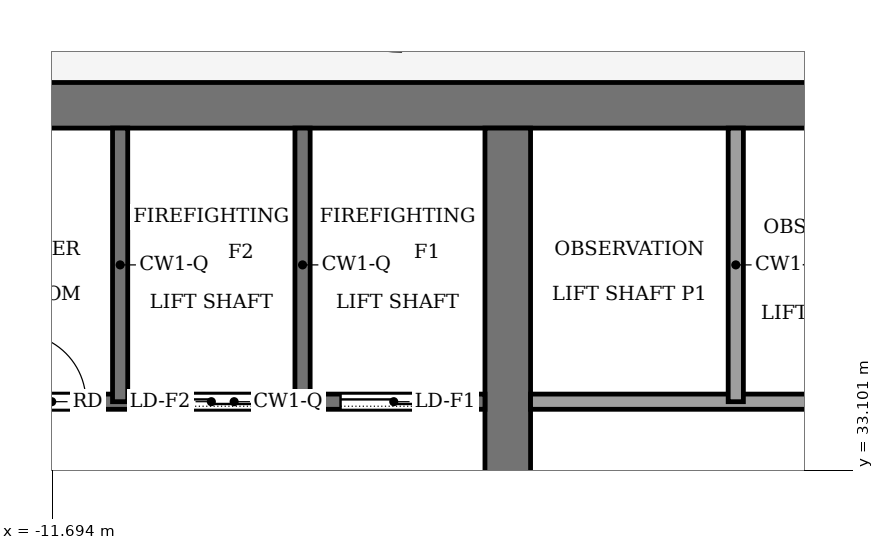
"""IFC4 building model, lengths in metres.
Left out: names, types, materials, properties, quantities, classifications, styles, units other than length and angle.
Written with IfcOpenShell. Run it as: python <this file> out.ifc"""

import sys

from ifc_helpers import new_model, si_unit, direction, frame, frame_2d, origin, place, context, subcontext, project, spatial, rectangle, extrude, element, fill, save


model = new_model("IFC4")
c1 = context("Model", 3, precision=1e-05, world=origin(), true_north=direction((0.0, 1.0)))
c2 = subcontext(c1, "Body", "Model", "MODEL_VIEW")
j1 = project(units=[si_unit("LENGTHUNIT", "METRE"), si_unit("PLANEANGLEUNIT", "RADIAN")], contexts=[c1])
p1 = place(None, origin())
s1 = spatial("IfcSite", under=j1, at=p1, CompositionType="ELEMENT")
p2 = place(p1, origin())
s2 = spatial("IfcBuilding", under=s1, at=p2, CompositionType="ELEMENT")
p3 = place(p2, frame((0.0, 0.0, 340.5)))
s3 = spatial("IfcBuildingStorey", under=s2, at=p3, CompositionType="ELEMENT", Elevation=340.5)
p4 = place(p3, frame((-13.2, 37.9, -0.15), z_axis=(0.0, 0.0, 1.0), x_axis=(1.0, 0.0, 0.0)))
e1 = element("IfcWall", 1, at=p4, inside=s3, PredefinedType="SHEAR", context=c2, shape_type="SweptSolid", body=[
    extrude(rectangle(XDim=26.4, YDim=0.6, at=frame_2d((13.2, 0.0))), origin(), (0.0, 0.0, 1.0), 9.0),
])
p5 = place(p3, frame((-5.7, 18.4, -0.15), z_axis=(0.0, 0.0, 1.0), x_axis=(0.0, 1.0, 0.0)))
e2 = element("IfcWall", 2, at=p5, inside=s3, PredefinedType="SHEAR", context=c2, shape_type="SweptSolid", body=[
    extrude(rectangle(XDim=19.2, YDim=0.6, at=frame_2d((9.6, 0.0))), origin(), (0.0, 0.0, 1.0), 9.0),
])
p6 = place(p5, frame((8.35, 0.0, 0.15)))
e3 = element("IfcOpeningElement", 3, at=p6, cuts=e2, PredefinedType="OPENING", context=c2, shape_type="SweptSolid", body=[
    extrude(rectangle(XDim=0.9, YDim=2.1, at=frame_2d((0.45, 1.05))), frame((0.0, 0.31, 0.0), z_axis=(0.0, -1.0, 0.0), x_axis=(1.0, 0.0, 0.0)), (0.0, 0.0, 1.0), 0.62),
])
p7 = place(p3, frame((-12.6, 34.0, 0.0), z_axis=(0.0, 0.0, 1.0), x_axis=(1.0, 0.0, 0.0)))
e4 = element("IfcWall", 4, at=p7, inside=s3, PredefinedType="PARTITIONING", context=c2, shape_type="SweptSolid", body=[
    extrude(rectangle(XDim=6.6, YDim=0.2, at=frame_2d((3.3, 0.0))), origin(), (0.0, 0.0, 1.0), 8.85),
])
p8 = place(p7, frame((4.7, 0.0, 0.0)))
e5 = element("IfcOpeningElement", 5, at=p8, cuts=e4, PredefinedType="OPENING", context=c2, shape_type="SweptSolid", body=[
    extrude(rectangle(XDim=1.4, YDim=2.2, at=frame_2d((0.7, 1.1))), frame((0.0, 0.11, 0.0), z_axis=(0.0, -1.0, 0.0), x_axis=(1.0, 0.0, 0.0)), (0.0, 0.0, 1.0), 0.22),
])
p9 = place(p7, frame((2.3, 0.0, 0.0)))
e6 = element("IfcOpeningElement", 6, at=p9, cuts=e4, PredefinedType="OPENING", context=c2, shape_type="SweptSolid", body=[
    extrude(rectangle(XDim=1.4, YDim=2.2, at=frame_2d((0.7, 1.1))), frame((0.0, 0.11, 0.0), z_axis=(0.0, -1.0, 0.0), x_axis=(1.0, 0.0, 0.0)), (0.0, 0.0, 1.0), 0.22),
])
p10 = place(p7, frame((0.45, 0.0, 0.0)))
e7 = element("IfcOpeningElement", 7, at=p10, cuts=e4, PredefinedType="OPENING", context=c2, shape_type="SweptSolid", body=[
    extrude(rectangle(XDim=0.9, YDim=2.1, at=frame_2d((0.45, 1.05))), frame((0.0, 0.11, 0.0), z_axis=(0.0, -1.0, 0.0), x_axis=(1.0, 0.0, 0.0)), (0.0, 0.0, 1.0), 0.22),
])
p11 = place(p3, frame((-5.4, 34.0, 0.0), z_axis=(0.0, 0.0, 1.0), x_axis=(1.0, 0.0, 0.0)))
e8 = element("IfcWall", 8, at=p11, inside=s3, PredefinedType="PARTITIONING", context=c2, shape_type="SweptSolid", body=[
    extrude(rectangle(XDim=10.8, YDim=0.2, at=frame_2d((5.4, 0.0))), origin(), (0.0, 0.0, 1.0), 8.85),
])
p12 = place(p11, frame((8.95, 0.0, 0.0)))
e9 = element("IfcOpeningElement", 9, at=p12, cuts=e8, PredefinedType="OPENING", context=c2, shape_type="SweptSolid", body=[
    extrude(rectangle(XDim=1.0, YDim=2.1, at=frame_2d((0.5, 1.05))), frame((0.0, 0.11, 0.0), z_axis=(0.0, -1.0, 0.0), x_axis=(1.0, 0.0, 0.0)), (0.0, 0.0, 1.0), 0.22),
])
for number, where, z_axis, x_axis in (
    (10, (-10.8, 34.0, 0.0), (0.0, 0.0, 1.0), (0.0, 1.0, 0.0)),
    (11, (-8.4, 34.0, 0.0), (0.0, 0.0, 1.0), (0.0, 1.0, 0.0)),
    (12, (-2.7, 34.0, 0.0), (0.0, 0.0, 1.0), (0.0, 1.0, 0.0)),
):
    element("IfcWall", number, at=place(p3, frame(where, z_axis=z_axis, x_axis=x_axis)), inside=s3, PredefinedType="PARTITIONING", context=c2, shape_type="SweptSolid", body=[
        extrude(rectangle(XDim=3.6, YDim=0.2, at=frame_2d((1.8, 0.0))), origin(), (0.0, 0.0, 1.0), 8.85),
    ])
p13 = place(p8, origin())
e13 = element("IfcDoor", 13, at=p13, inside=s3, OperationType="SLIDING_TO_LEFT", PredefinedType="DOOR", context=c2, shape_type="SweptSolid", body=[
    extrude(rectangle(XDim=1.4, YDim=2.2, at=frame_2d((0.7, 1.1))), frame((0.0, 0.025, 0.0), z_axis=(0.0, -1.0, 0.0), x_axis=(1.0, 0.0, 0.0)), (0.0, 0.0, 1.0), 0.05),
])
fill(e5, e13)
p14 = place(p9, origin())
e14 = element("IfcDoor", 14, at=p14, inside=s3, OperationType="SLIDING_TO_LEFT", PredefinedType="DOOR", context=c2, shape_type="SweptSolid", body=[
    extrude(rectangle(XDim=1.4, YDim=2.2, at=frame_2d((0.7, 1.1))), frame((0.0, 0.025, 0.0), z_axis=(0.0, -1.0, 0.0), x_axis=(1.0, 0.0, 0.0)), (0.0, 0.0, 1.0), 0.05),
])
fill(e6, e14)
p15 = place(p10, origin())
e15 = element("IfcDoor", 15, at=p15, inside=s3, OperationType="SINGLE_SWING_LEFT", PredefinedType="DOOR", context=c2, shape_type="SweptSolid", body=[
    extrude(rectangle(XDim=0.9, YDim=2.1, at=frame_2d((0.45, 1.05))), frame((0.0, 0.025, 0.0), z_axis=(0.0, -1.0, 0.0), x_axis=(1.0, 0.0, 0.0)), (0.0, 0.0, 1.0), 0.05),
])
fill(e7, e15)
save(model, sys.argv[1])
